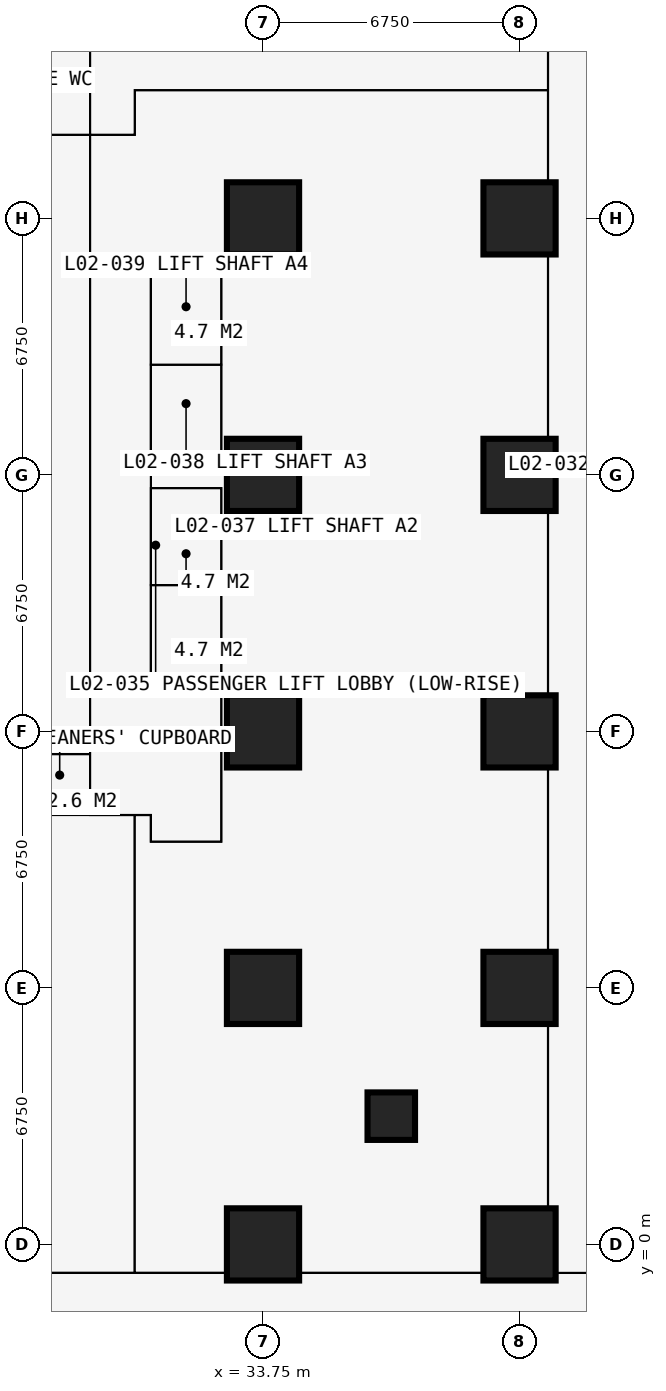
"""IFC4 building model, lengths in metres.
Left out: names, types, materials, properties, quantities, classifications, styles, units other than length and angle.
Written with IfcOpenShell. Run it as: python <this file> out.ifc"""

import sys

from ifc_helpers import new_model, si_unit, direction, frame, frame_2d, origin, origin_2d, place, context, subcontext, project, spatial, rectangle, extrude, element, fill, save


model = new_model("IFC4")
c1 = context("Model", 3, precision=1e-05, world=origin(), true_north=direction((0.0, 1.0)))
c2 = subcontext(c1, "Body", "Model", "MODEL_VIEW")
j1 = project(units=[si_unit("LENGTHUNIT", "METRE"), si_unit("PLANEANGLEUNIT", "RADIAN")], contexts=[c1])
p1 = place(None, origin())
s1 = spatial("IfcSite", under=j1, at=p1, CompositionType="ELEMENT")
p2 = place(p1, origin())
s2 = spatial("IfcBuilding", under=s1, at=p2, CompositionType="ELEMENT")
p3 = place(p2, frame((0.0, 0.0, 9.0)))
s3 = spatial("IfcBuildingStorey", under=s2, at=p3, CompositionType="ELEMENT", Elevation=9.0)
for number, where, z_axis, x_axis in (
    (1, (33.75, 0.0, 0.0), (0.0, 0.0, 1.0), (1.0, 0.0, 0.0)),
    (2, (33.75, 6.75, 0.0), (0.0, 0.0, 1.0), (1.0, 0.0, 0.0)),
    (3, (33.75, 13.5, 0.0), (0.0, 0.0, 1.0), (1.0, 0.0, 0.0)),
    (4, (33.75, 20.25, 0.0), (0.0, 0.0, 1.0), (1.0, 0.0, 0.0)),
    (5, (33.75, 27.0, 0.0), (0.0, 0.0, 1.0), (1.0, 0.0, 0.0)),
):
    element("IfcColumn", number, at=place(p3, frame(where, z_axis=z_axis, x_axis=x_axis)), inside=s3, PredefinedType="COLUMN", context=c2, shape_type="SweptSolid", body=[
        extrude(rectangle(XDim=1.9, YDim=1.9, at=origin_2d()), origin(), (0.0, 0.0, 1.0), 4.5),
    ])
p4 = place(p3, frame((37.125, 3.375, 0.0), z_axis=(0.0, 0.0, 1.0), x_axis=(1.0, 0.0, 0.0)))
e6 = element("IfcColumn", 6, at=p4, inside=s3, PredefinedType="COLUMN", context=c2, shape_type="SweptSolid", body=[
    extrude(rectangle(XDim=1.25, YDim=1.25, at=origin_2d()), origin(), (0.0, 0.0, 1.0), 4.5),
])
for number, where, z_axis, x_axis in (
    (7, (40.5, 0.0, 0.0), (0.0, 0.0, 1.0), (1.0, 0.0, 0.0)),
    (8, (40.5, 6.75, 0.0), (0.0, 0.0, 1.0), (1.0, 0.0, 0.0)),
    (9, (40.5, 13.5, 0.0), (0.0, 0.0, 1.0), (1.0, 0.0, 0.0)),
    (10, (40.5, 20.25, 0.0), (0.0, 0.0, 1.0), (1.0, 0.0, 0.0)),
    (11, (40.5, 27.0, 0.0), (0.0, 0.0, 1.0), (1.0, 0.0, 0.0)),
):
    element("IfcColumn", number, at=place(p3, frame(where, z_axis=z_axis, x_axis=x_axis)), inside=s3, PredefinedType="COLUMN", context=c2, shape_type="SweptSolid", body=[
        extrude(rectangle(XDim=1.9, YDim=1.9, at=origin_2d()), origin(), (0.0, 0.0, 1.0), 4.5),
    ])
p5 = place(p3, frame((-7.484, -0.75, 0.0), z_axis=(0.0, 0.0, 1.0), x_axis=(1.0, 0.0, 0.0)))
e12 = element("IfcWall", 12, at=p5, inside=s3, PredefinedType="PARTITIONING", context=c2, shape_type="SweptSolid", body=[
    extrude(rectangle(XDim=50.334, YDim=0.15, at=frame_2d((25.167, 0.0))), origin(), (0.0, 0.0, 1.0), 4.25),
])
p6 = place(p5, frame((21.934, 0.0, 0.0)))
e13 = element("IfcOpeningElement", 13, at=p6, cuts=e12, PredefinedType="OPENING", context=c2, shape_type="SweptSolid", body=[
    extrude(rectangle(XDim=1.6, YDim=2.4, at=frame_2d((0.8, 1.2))), frame((0.0, 0.085, 0.0), z_axis=(0.0, -1.0, 0.0), x_axis=(1.0, 0.0, 0.0)), (0.0, 0.0, 1.0), 0.17),
])
p7 = place(p3, frame((8.9, 29.2, 0.0), z_axis=(0.0, 0.0, 1.0), x_axis=(1.0, 0.0, 0.0)))
e14 = element("IfcWall", 14, at=p7, inside=s3, PredefinedType="PARTITIONING", context=c2, shape_type="SweptSolid", body=[
    extrude(rectangle(XDim=21.475, YDim=0.15, at=frame_2d((10.738, 0.0))), origin(), (0.0, 0.0, 1.0), 4.25),
])
p8 = place(p7, frame((16.65, 0.0, 0.0)))
e15 = element("IfcOpeningElement", 15, at=p8, cuts=e14, PredefinedType="OPENING", context=c2, shape_type="SweptSolid", body=[
    extrude(rectangle(XDim=1.0, YDim=2.2, at=frame_2d((0.5, 1.1))), frame((0.0, 0.085, 0.0), z_axis=(0.0, -1.0, 0.0), x_axis=(1.0, 0.0, 0.0)), (0.0, 0.0, 1.0), 0.17),
])
p9 = place(p7, frame((18.75, 0.0, 0.0)))
e16 = element("IfcOpeningElement", 16, at=p9, cuts=e14, PredefinedType="OPENING", context=c2, shape_type="SweptSolid", body=[
    extrude(rectangle(XDim=1.0, YDim=2.2, at=frame_2d((0.5, 1.1))), frame((0.0, 0.085, 0.0), z_axis=(0.0, -1.0, 0.0), x_axis=(1.0, 0.0, 0.0)), (0.0, 0.0, 1.0), 0.17),
])
p10 = place(p7, frame((8.45, 0.0, 0.0)))
e17 = element("IfcOpeningElement", 17, at=p10, cuts=e14, PredefinedType="OPENING", context=c2, shape_type="SweptSolid", body=[
    extrude(rectangle(XDim=1.6, YDim=2.4, at=frame_2d((0.8, 1.2))), frame((0.0, 0.085, 0.0), z_axis=(0.0, -1.0, 0.0), x_axis=(1.0, 0.0, 0.0)), (0.0, 0.0, 1.0), 0.17),
])
p11 = place(p3, frame((10.125, 11.3, 0.0), z_axis=(0.0, 0.0, 1.0), x_axis=(1.0, 0.0, 0.0)))
e18 = element("IfcWall", 18, at=p11, inside=s3, PredefinedType="PARTITIONING", context=c2, shape_type="SweptSolid", body=[
    extrude(rectangle(XDim=20.675, YDim=0.15, at=frame_2d((10.337, 0.0))), origin(), (0.0, 0.0, 1.0), 4.25),
])
p12 = place(p11, frame((1.725, 0.0, 0.0)))
e19 = element("IfcOpeningElement", 19, at=p12, cuts=e18, PredefinedType="OPENING", context=c2, shape_type="SweptSolid", body=[
    extrude(rectangle(XDim=1.0, YDim=2.2, at=frame_2d((0.5, 1.1))), frame((0.0, 0.085, 0.0), z_axis=(0.0, -1.0, 0.0), x_axis=(1.0, 0.0, 0.0)), (0.0, 0.0, 1.0), 0.17),
])
p13 = place(p11, frame((3.825, 0.0, 0.0)))
e20 = element("IfcOpeningElement", 20, at=p13, cuts=e18, PredefinedType="OPENING", context=c2, shape_type="SweptSolid", body=[
    extrude(rectangle(XDim=1.0, YDim=2.2, at=frame_2d((0.5, 1.1))), frame((0.0, 0.085, 0.0), z_axis=(0.0, -1.0, 0.0), x_axis=(1.0, 0.0, 0.0)), (0.0, 0.0, 1.0), 0.17),
])
p14 = place(p11, frame((10.675, 0.0, 0.0)))
e21 = element("IfcOpeningElement", 21, at=p14, cuts=e18, PredefinedType="OPENING", context=c2, shape_type="SweptSolid", body=[
    extrude(rectangle(XDim=1.5, YDim=2.2, at=frame_2d((0.75, 1.1))), frame((0.0, 0.085, 0.0), z_axis=(0.0, -1.0, 0.0), x_axis=(1.0, 0.0, 0.0)), (0.0, 0.0, 1.0), 0.17),
])
p15 = place(p3, frame((27.6, 12.9, 0.0), z_axis=(0.0, 0.0, 1.0), x_axis=(1.0, 0.0, 0.0)))
e22 = element("IfcWall", 22, at=p15, inside=s3, PredefinedType="PARTITIONING", context=c2, shape_type="SweptSolid", body=[
    extrude(rectangle(XDim=1.6, YDim=0.15, at=frame_2d((0.8, 0.0))), origin(), (0.0, 0.0, 1.0), 3.752),
])
p16 = place(p3, frame((29.2, 11.3, 0.0), z_axis=(0.0, 0.0, 1.0), x_axis=(0.0, 1.0, 0.0)))
e23 = element("IfcWall", 23, at=p16, inside=s3, PredefinedType="PARTITIONING", context=c2, shape_type="SweptSolid", body=[
    extrude(rectangle(XDim=20.3, YDim=0.15, at=frame_2d((10.15, 0.0))), origin(), (0.0, 0.0, 1.0), 4.25),
])
p17 = place(p16, frame((15.35, 0.0, 0.0)))
e24 = element("IfcOpeningElement", 24, at=p17, cuts=e23, PredefinedType="OPENING", context=c2, shape_type="SweptSolid", body=[
    extrude(rectangle(XDim=1.6, YDim=2.4, at=frame_2d((0.8, 1.2))), frame((0.0, 0.085, 0.0), z_axis=(0.0, -1.0, 0.0), x_axis=(1.0, 0.0, 0.0)), (0.0, 0.0, 1.0), 0.17),
])
p18 = place(p16, frame((8.35, 0.0, 0.0)))
e25 = element("IfcOpeningElement", 25, at=p18, cuts=e23, PredefinedType="OPENING", context=c2, shape_type="SweptSolid", body=[
    extrude(rectangle(XDim=1.2, YDim=2.2, at=frame_2d((0.6, 1.1))), frame((0.0, 0.085, 0.0), z_axis=(0.0, -1.0, 0.0), x_axis=(1.0, 0.0, 0.0)), (0.0, 0.0, 1.0), 0.17),
])
p19 = place(p3, frame((29.2, 25.7, 0.0), z_axis=(0.0, 0.0, 1.0), x_axis=(1.0, 0.0, 0.0)))
e26 = element("IfcWall", 26, at=p19, inside=s3, PredefinedType="SHEAR", context=c2, shape_type="SweptSolid", body=[
    extrude(rectangle(XDim=3.45, YDim=0.1, at=frame_2d((1.725, 0.0))), origin(), (0.0, 0.0, 1.0), 4.25),
])
p20 = place(p3, frame((30.375, -0.75, 0.0), z_axis=(0.0, 0.0, 1.0), x_axis=(0.0, 1.0, 0.0)))
e27 = element("IfcWall", 27, at=p20, inside=s3, PredefinedType="PARTITIONING", context=c2, shape_type="SweptSolid", body=[
    extrude(rectangle(XDim=12.05, YDim=0.15, at=frame_2d((6.025, 0.0))), origin(), (0.0, 0.0, 1.0), 4.25),
])
p21 = place(p3, frame((30.375, 29.2, 0.0), z_axis=(0.0, 0.0, 1.0), x_axis=(0.0, 1.0, 0.0)))
e28 = element("IfcWall", 28, at=p21, inside=s3, PredefinedType="PARTITIONING", context=c2, shape_type="SweptSolid", body=[
    extrude(rectangle(XDim=1.175, YDim=0.15, at=frame_2d((0.587, 0.0))), origin(), (0.0, 0.0, 1.0), 4.25),
])
p22 = place(p3, frame((30.375, 30.375, 0.0), z_axis=(0.0, 0.0, 1.0), x_axis=(1.0, 0.0, 0.0)))
e29 = element("IfcWall", 29, at=p22, inside=s3, PredefinedType="PARTITIONING", context=c2, shape_type="SweptSolid", body=[
    extrude(rectangle(XDim=10.875, YDim=0.15, at=frame_2d((5.438, 0.0))), origin(), (0.0, 0.0, 1.0), 4.25),
])
p23 = place(p3, frame((30.8, 10.6, 0.0), z_axis=(0.0, 0.0, 1.0), x_axis=(0.0, 1.0, 0.0)))
e30 = element("IfcWall", 30, at=p23, inside=s3, PredefinedType="PARTITIONING", context=c2, shape_type="SweptSolid", body=[
    extrude(rectangle(XDim=0.7, YDim=0.15, at=frame_2d((0.35, 0.0))), origin(), (0.0, 0.0, 1.0), 4.25),
])
p24 = place(p3, frame((30.8, 10.6, 0.0), z_axis=(0.0, 0.0, 1.0), x_axis=(1.0, 0.0, 0.0)))
e31 = element("IfcWall", 31, at=p24, inside=s3, PredefinedType="PARTITIONING", context=c2, shape_type="SweptSolid", body=[
    extrude(rectangle(XDim=1.85, YDim=0.15, at=frame_2d((0.925, 0.0))), origin(), (0.0, 0.0, 1.0), 4.25),
])
p25 = place(p3, frame((30.8, 14.8, 0.0), z_axis=(0.0, 0.0, 1.0), x_axis=(0.0, 1.0, 0.0)))
e32 = element("IfcWall", 32, at=p25, inside=s3, PredefinedType="PARTITIONING", context=c2, shape_type="SweptSolid", body=[
    extrude(rectangle(XDim=10.9, YDim=0.15, at=frame_2d((5.45, 0.0))), origin(), (0.0, 0.0, 1.0), 4.25),
])
p26 = place(p25, frame((0.75, 0.0, 0.0)))
e33 = element("IfcOpeningElement", 33, at=p26, cuts=e32, PredefinedType="OPENING", context=c2, shape_type="SweptSolid", body=[
    extrude(rectangle(XDim=1.1, YDim=2.2, at=frame_2d((0.55, 1.1))), frame((0.0, 0.085, 0.0), z_axis=(0.0, -1.0, 0.0), x_axis=(1.0, 0.0, 0.0)), (0.0, 0.0, 1.0), 0.17),
])
p27 = place(p25, frame((3.25, 0.0, 0.0)))
e34 = element("IfcOpeningElement", 34, at=p27, cuts=e32, PredefinedType="OPENING", context=c2, shape_type="SweptSolid", body=[
    extrude(rectangle(XDim=1.1, YDim=2.2, at=frame_2d((0.55, 1.1))), frame((0.0, 0.085, 0.0), z_axis=(0.0, -1.0, 0.0), x_axis=(1.0, 0.0, 0.0)), (0.0, 0.0, 1.0), 0.17),
])
p28 = place(p25, frame((6.5, 0.0, 0.0)))
e35 = element("IfcOpeningElement", 35, at=p28, cuts=e32, PredefinedType="OPENING", context=c2, shape_type="SweptSolid", body=[
    extrude(rectangle(XDim=1.1, YDim=2.2, at=frame_2d((0.55, 1.1))), frame((0.0, 0.085, 0.0), z_axis=(0.0, -1.0, 0.0), x_axis=(1.0, 0.0, 0.0)), (0.0, 0.0, 1.0), 0.17),
])
p29 = place(p25, frame((9.05, 0.0, 0.0)))
e36 = element("IfcOpeningElement", 36, at=p29, cuts=e32, PredefinedType="OPENING", context=c2, shape_type="SweptSolid", body=[
    extrude(rectangle(XDim=1.1, YDim=2.2, at=frame_2d((0.55, 1.1))), frame((0.0, 0.085, 0.0), z_axis=(0.0, -1.0, 0.0), x_axis=(1.0, 0.0, 0.0)), (0.0, 0.0, 1.0), 0.17),
])
for number, where, z_axis, x_axis in (
    (37, (30.8, 14.8, 0.0), (0.0, 0.0, 1.0), (1.0, 0.0, 0.0)),
    (38, (30.8, 17.35, 0.0), (0.0, 0.0, 1.0), (1.0, 0.0, 0.0)),
    (39, (30.8, 19.9, 0.0), (0.0, 0.0, 1.0), (1.0, 0.0, 0.0)),
    (40, (30.8, 20.6, 0.0), (0.0, 0.0, 1.0), (1.0, 0.0, 0.0)),
    (41, (30.8, 23.15, 0.0), (0.0, 0.0, 1.0), (1.0, 0.0, 0.0)),
):
    element("IfcWall", number, at=place(p3, frame(where, z_axis=z_axis, x_axis=x_axis)), inside=s3, PredefinedType="SHEAR", context=c2, shape_type="SweptSolid", body=[
        extrude(rectangle(XDim=1.85, YDim=0.1, at=frame_2d((0.925, 0.0))), origin(), (0.0, 0.0, 1.0), 4.25),
    ])
p30 = place(p3, frame((32.65, 10.6, 0.0), z_axis=(0.0, 0.0, 1.0), x_axis=(0.0, 1.0, 0.0)))
e42 = element("IfcWall", 42, at=p30, inside=s3, PredefinedType="SHEAR", context=c2, shape_type="SweptSolid", body=[
    extrude(rectangle(XDim=9.3, YDim=0.1, at=frame_2d((4.65, 0.0))), origin(), (0.0, 0.0, 1.0), 4.25),
])
p31 = place(p3, frame((32.65, 20.6, 0.0), z_axis=(0.0, 0.0, 1.0), x_axis=(0.0, 1.0, 0.0)))
e43 = element("IfcWall", 43, at=p31, inside=s3, PredefinedType="PARTITIONING", context=c2, shape_type="SweptSolid", body=[
    extrude(rectangle(XDim=5.1, YDim=0.15, at=frame_2d((2.55, 0.0))), origin(), (0.0, 0.0, 1.0), 4.25),
])
p32 = place(p3, frame((41.25, -0.75, 0.0), z_axis=(0.0, 0.0, 1.0), x_axis=(0.0, 1.0, 0.0)))
e44 = element("IfcWall", 44, at=p32, inside=s3, PredefinedType="PARTITIONING", context=c2, shape_type="SweptSolid", body=[
    extrude(rectangle(XDim=41.984, YDim=0.15, at=frame_2d((20.992, 0.0))), origin(), (0.0, 0.0, 1.0), 4.25),
])
p33 = place(p32, frame((15.2, 0.0, 0.0)))
e45 = element("IfcOpeningElement", 45, at=p33, cuts=e44, PredefinedType="OPENING", context=c2, shape_type="SweptSolid", body=[
    extrude(rectangle(XDim=1.6, YDim=2.4, at=frame_2d((0.8, 1.2))), frame((0.0, 0.085, 0.0), z_axis=(0.0, -1.0, 0.0), x_axis=(1.0, 0.0, 0.0)), (0.0, 0.0, 1.0), 0.17),
])
p34 = place(p17, origin())
e46 = element("IfcDoor", 46, at=p34, inside=s3, OperationType="DOUBLE_DOOR_SINGLE_SWING", PredefinedType="DOOR", context=c2, shape_type="SweptSolid", body=[
    extrude(rectangle(XDim=1.6, YDim=2.4, at=frame_2d((0.8, 1.2))), frame((0.0, 0.025, 0.0), z_axis=(0.0, -1.0, 0.0), x_axis=(1.0, 0.0, 0.0)), (0.0, 0.0, 1.0), 0.05),
])
fill(e24, e46)
p35 = place(p9, origin())
e47 = element("IfcDoor", 47, at=p35, inside=s3, OperationType="SINGLE_SWING_LEFT", PredefinedType="DOOR", context=c2, shape_type="SweptSolid", body=[
    extrude(rectangle(XDim=1.0, YDim=2.2, at=frame_2d((0.5, 1.1))), frame((0.0, 0.025, 0.0), z_axis=(0.0, -1.0, 0.0), x_axis=(1.0, 0.0, 0.0)), (0.0, 0.0, 1.0), 0.05),
])
fill(e16, e47)
p36 = place(p33, origin())
e48 = element("IfcDoor", 48, at=p36, inside=s3, OperationType="DOUBLE_DOOR_SINGLE_SWING", PredefinedType="DOOR", context=c2, shape_type="SweptSolid", body=[
    extrude(rectangle(XDim=1.6, YDim=2.4, at=frame_2d((0.8, 1.2))), frame((0.0, 0.025, 0.0), z_axis=(0.0, -1.0, 0.0), x_axis=(1.0, 0.0, 0.0)), (0.0, 0.0, 1.0), 0.05),
])
fill(e45, e48)
p37 = place(p26, origin())
e49 = element("IfcDoor", 49, at=p37, inside=s3, OperationType="DOUBLE_DOOR_SLIDING", PredefinedType="DOOR", context=c2, shape_type="SweptSolid", body=[
    extrude(rectangle(XDim=1.1, YDim=2.2, at=frame_2d((0.55, 1.1))), frame((0.0, 0.025, 0.0), z_axis=(0.0, -1.0, 0.0), x_axis=(1.0, 0.0, 0.0)), (0.0, 0.0, 1.0), 0.05),
])
fill(e33, e49)
p38 = place(p27, origin())
e50 = element("IfcDoor", 50, at=p38, inside=s3, OperationType="DOUBLE_DOOR_SLIDING", PredefinedType="DOOR", context=c2, shape_type="SweptSolid", body=[
    extrude(rectangle(XDim=1.1, YDim=2.2, at=frame_2d((0.55, 1.1))), frame((0.0, 0.025, 0.0), z_axis=(0.0, -1.0, 0.0), x_axis=(1.0, 0.0, 0.0)), (0.0, 0.0, 1.0), 0.05),
])
fill(e34, e50)
p39 = place(p28, origin())
e51 = element("IfcDoor", 51, at=p39, inside=s3, OperationType="DOUBLE_DOOR_SLIDING", PredefinedType="DOOR", context=c2, shape_type="SweptSolid", body=[
    extrude(rectangle(XDim=1.1, YDim=2.2, at=frame_2d((0.55, 1.1))), frame((0.0, 0.025, 0.0), z_axis=(0.0, -1.0, 0.0), x_axis=(1.0, 0.0, 0.0)), (0.0, 0.0, 1.0), 0.05),
])
fill(e35, e51)
p40 = place(p29, origin())
e52 = element("IfcDoor", 52, at=p40, inside=s3, OperationType="DOUBLE_DOOR_SLIDING", PredefinedType="DOOR", context=c2, shape_type="SweptSolid", body=[
    extrude(rectangle(XDim=1.1, YDim=2.2, at=frame_2d((0.55, 1.1))), frame((0.0, 0.025, 0.0), z_axis=(0.0, -1.0, 0.0), x_axis=(1.0, 0.0, 0.0)), (0.0, 0.0, 1.0), 0.05),
])
fill(e36, e52)
p41 = place(p18, origin())
e53 = element("IfcDoor", 53, at=p41, inside=s3, OperationType="DOUBLE_DOOR_SINGLE_SWING", PredefinedType="DOOR", context=c2, shape_type="SweptSolid", body=[
    extrude(rectangle(XDim=1.2, YDim=2.2, at=frame_2d((0.6, 1.1))), frame((0.0, 0.025, 0.0), z_axis=(0.0, -1.0, 0.0), x_axis=(1.0, 0.0, 0.0)), (0.0, 0.0, 1.0), 0.05),
])
fill(e25, e53)
save(model, sys.argv[1])
